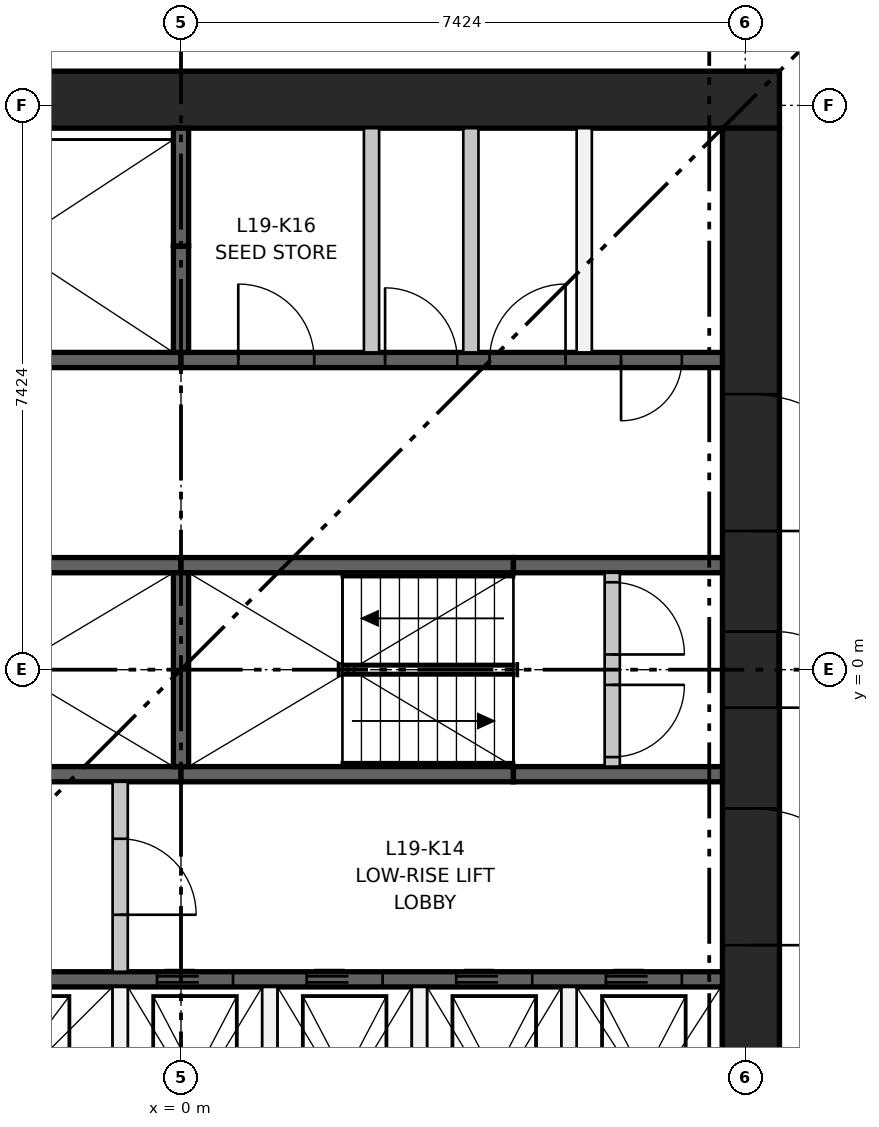
"""IFC4 building model, lengths in metres.
Left out: names, types, materials, properties, quantities, classifications, styles, units other than length and angle.
Written with IfcOpenShell. Run it as: python <this file> out.ifc"""

import sys

from ifc_helpers import new_model, si_unit, direction, frame, frame_2d, origin, place, context, subcontext, project, spatial, rectangle, extrude, element, fill, save


model = new_model("IFC4")
c1 = context("Model", 3, precision=1e-05, world=origin(), true_north=direction((0.0, 1.0)))
c2 = subcontext(c1, "Body", "Model", "MODEL_VIEW")
j1 = project(units=[si_unit("LENGTHUNIT", "METRE"), si_unit("PLANEANGLEUNIT", "RADIAN")], contexts=[c1])
p1 = place(None, origin())
s1 = spatial("IfcSite", under=j1, at=p1, CompositionType="ELEMENT")
p2 = place(p1, origin())
s2 = spatial("IfcBuilding", under=s1, at=p2, CompositionType="ELEMENT")
p3 = place(p2, frame((0.0, 0.0, 76.4)))
s3 = spatial("IfcBuildingStorey", under=s2, at=p3, CompositionType="ELEMENT", Elevation=76.4)
p4 = place(p3, frame((-7.874, 7.499, 0.0), z_axis=(0.0, 0.0, 1.0), x_axis=(1.0, 0.0, 0.0)))
e1 = element("IfcWall", 1, at=p4, inside=s3, PredefinedType="SHEAR", context=c2, shape_type="SweptSolid", body=[
    extrude(rectangle(XDim=15.748, YDim=0.75, at=frame_2d((7.874, 0.0))), origin(), (0.0, 0.0, 1.0), 3.65),
])
p5 = place(p3, frame((7.499, -7.124, 0.0), z_axis=(0.0, 0.0, 1.0), x_axis=(0.0, 1.0, 0.0)))
e2 = element("IfcWall", 2, at=p5, inside=s3, PredefinedType="SHEAR", context=c2, shape_type="SweptSolid", body=[
    extrude(rectangle(XDim=14.248, YDim=0.75, at=frame_2d((7.124, 0.0))), origin(), (0.0, 0.0, 1.0), 3.65),
])
p6 = place(p5, frame((6.624, 0.0, 0.0)))
e3 = element("IfcOpeningElement", 3, at=p6, cuts=e2, PredefinedType="OPENING", context=c2, shape_type="SweptSolid", body=[
    extrude(rectangle(XDim=1.0, YDim=2.1, at=frame_2d((0.5, 1.05))), frame((0.0, 0.385, 0.0), z_axis=(0.0, -1.0, 0.0), x_axis=(1.0, 0.0, 0.0)), (0.0, 0.0, 1.0), 0.77),
])
p7 = place(p5, frame((3.5, 0.0, 0.0)))
e4 = element("IfcOpeningElement", 4, at=p7, cuts=e2, PredefinedType="OPENING", context=c2, shape_type="SweptSolid", body=[
    extrude(rectangle(XDim=1.8, YDim=2.1, at=frame_2d((0.9, 1.05))), frame((0.0, 0.385, 0.0), z_axis=(0.0, -1.0, 0.0), x_axis=(1.0, 0.0, 0.0)), (0.0, 0.0, 1.0), 0.77),
])
p8 = place(p5, frame((8.948, 0.0, 0.0)))
e5 = element("IfcOpeningElement", 5, at=p8, cuts=e2, PredefinedType="OPENING", context=c2, shape_type="SweptSolid", body=[
    extrude(rectangle(XDim=1.8, YDim=2.1, at=frame_2d((0.9, 1.05))), frame((0.0, 0.385, 0.0), z_axis=(0.0, -1.0, 0.0), x_axis=(1.0, 0.0, 0.0)), (0.0, 0.0, 1.0), 0.77),
])
p9 = place(p3, frame((-7.124, -4.074, 0.0), z_axis=(0.0, 0.0, 1.0), x_axis=(1.0, 0.0, 0.0)))
e6 = element("IfcWall", 6, at=p9, inside=s3, PredefinedType="SHEAR", context=c2, shape_type="SweptSolid", body=[
    extrude(rectangle(XDim=14.248, YDim=0.2, at=frame_2d((7.124, 0.0))), origin(), (0.0, 0.0, 1.0), 3.3),
])
p10 = place(p9, frame((1.069, 0.0, 0.0)))
e7 = element("IfcOpeningElement", 7, at=p10, cuts=e6, PredefinedType="OPENING", context=c2, shape_type="SweptSolid", body=[
    extrude(rectangle(XDim=1.1, YDim=2.1, at=frame_2d((0.55, 1.05))), frame((0.0, 0.11, 0.0), z_axis=(0.0, -1.0, 0.0), x_axis=(1.0, 0.0, 0.0)), (0.0, 0.0, 1.0), 0.22),
])
p11 = place(p9, frame((4.206, 0.0, 0.0)))
e8 = element("IfcOpeningElement", 8, at=p11, cuts=e6, PredefinedType="OPENING", context=c2, shape_type="SweptSolid", body=[
    extrude(rectangle(XDim=1.1, YDim=2.1, at=frame_2d((0.55, 1.05))), frame((0.0, 0.11, 0.0), z_axis=(0.0, -1.0, 0.0), x_axis=(1.0, 0.0, 0.0)), (0.0, 0.0, 1.0), 0.22),
])
p12 = place(p9, frame((6.808, 0.0, 0.0)))
e9 = element("IfcOpeningElement", 9, at=p12, cuts=e6, PredefinedType="OPENING", context=c2, shape_type="SweptSolid", body=[
    extrude(rectangle(XDim=1.0, YDim=2.1, at=frame_2d((0.5, 1.05))), frame((0.0, 0.11, 0.0), z_axis=(0.0, -1.0, 0.0), x_axis=(1.0, 0.0, 0.0)), (0.0, 0.0, 1.0), 0.22),
])
p13 = place(p9, frame((8.777, 0.0, 0.0)))
e10 = element("IfcOpeningElement", 10, at=p13, cuts=e6, PredefinedType="OPENING", context=c2, shape_type="SweptSolid", body=[
    extrude(rectangle(XDim=1.0, YDim=2.1, at=frame_2d((0.5, 1.05))), frame((0.0, 0.11, 0.0), z_axis=(0.0, -1.0, 0.0), x_axis=(1.0, 0.0, 0.0)), (0.0, 0.0, 1.0), 0.22),
])
p14 = place(p9, frame((10.745, 0.0, 0.0)))
e11 = element("IfcOpeningElement", 11, at=p14, cuts=e6, PredefinedType="OPENING", context=c2, shape_type="SweptSolid", body=[
    extrude(rectangle(XDim=1.0, YDim=2.1, at=frame_2d((0.5, 1.05))), frame((0.0, 0.11, 0.0), z_axis=(0.0, -1.0, 0.0), x_axis=(1.0, 0.0, 0.0)), (0.0, 0.0, 1.0), 0.22),
])
p15 = place(p9, frame((12.714, 0.0, 0.0)))
e12 = element("IfcOpeningElement", 12, at=p15, cuts=e6, PredefinedType="OPENING", context=c2, shape_type="SweptSolid", body=[
    extrude(rectangle(XDim=1.0, YDim=2.1, at=frame_2d((0.5, 1.05))), frame((0.0, 0.11, 0.0), z_axis=(0.0, -1.0, 0.0), x_axis=(1.0, 0.0, 0.0)), (0.0, 0.0, 1.0), 0.22),
])
p16 = place(p3, frame((-7.124, 4.074, 0.0), z_axis=(0.0, 0.0, 1.0), x_axis=(1.0, 0.0, 0.0)))
e13 = element("IfcWall", 13, at=p16, inside=s3, PredefinedType="SHEAR", context=c2, shape_type="SweptSolid", body=[
    extrude(rectangle(XDim=7.124, YDim=0.2, at=frame_2d((3.562, 0.0))), origin(), (0.0, 0.0, 1.0), 3.3),
])
p17 = place(p3, frame((0.0, 4.074, 0.0), z_axis=(0.0, 0.0, 1.0), x_axis=(1.0, 0.0, 0.0)))
e14 = element("IfcWall", 14, at=p17, inside=s3, PredefinedType="SHEAR", context=c2, shape_type="SweptSolid", body=[
    extrude(rectangle(XDim=7.124, YDim=0.2, at=frame_2d((3.562, 0.0))), origin(), (0.0, 0.0, 1.0), 3.3),
])
p18 = place(p17, frame((0.753, 0.0, 0.0)))
e15 = element("IfcOpeningElement", 15, at=p18, cuts=e14, PredefinedType="OPENING", context=c2, shape_type="SweptSolid", body=[
    extrude(rectangle(XDim=1.0, YDim=2.1, at=frame_2d((0.5, 1.05))), frame((0.0, 0.11, 0.0), z_axis=(0.0, -1.0, 0.0), x_axis=(1.0, 0.0, 0.0)), (0.0, 0.0, 1.0), 0.22),
])
p19 = place(p17, frame((2.685, 0.0, 0.0)))
e16 = element("IfcOpeningElement", 16, at=p19, cuts=e14, PredefinedType="OPENING", context=c2, shape_type="SweptSolid", body=[
    extrude(rectangle(XDim=0.95, YDim=2.1, at=frame_2d((0.475, 1.05))), frame((0.0, 0.11, 0.0), z_axis=(0.0, -1.0, 0.0), x_axis=(1.0, 0.0, 0.0)), (0.0, 0.0, 1.0), 0.22),
])
p20 = place(p17, frame((4.06, 0.0, 0.0)))
e17 = element("IfcOpeningElement", 17, at=p20, cuts=e14, PredefinedType="OPENING", context=c2, shape_type="SweptSolid", body=[
    extrude(rectangle(XDim=1.0, YDim=2.1, at=frame_2d((0.5, 1.05))), frame((0.0, 0.11, 0.0), z_axis=(0.0, -1.0, 0.0), x_axis=(1.0, 0.0, 0.0)), (0.0, 0.0, 1.0), 0.22),
])
p21 = place(p17, frame((5.79, 0.0, 0.0)))
e18 = element("IfcOpeningElement", 18, at=p21, cuts=e14, PredefinedType="OPENING", context=c2, shape_type="SweptSolid", body=[
    extrude(rectangle(XDim=0.8, YDim=2.1, at=frame_2d((0.4, 1.05))), frame((0.0, 0.11, 0.0), z_axis=(0.0, -1.0, 0.0), x_axis=(1.0, 0.0, 0.0)), (0.0, 0.0, 1.0), 0.22),
])
for number, where, z_axis, x_axis in (
    (19, (-4.374, -1.375, 0.0), (0.0, 0.0, 1.0), (1.0, 0.0, 0.0)),
    (20, (0.0, -1.375, 0.0), (0.0, 0.0, 1.0), (1.0, 0.0, 0.0)),
):
    element("IfcWall", number, at=place(p3, frame(where, z_axis=z_axis, x_axis=x_axis)), inside=s3, PredefinedType="SHEAR", context=c2, shape_type="SweptSolid", body=[
        extrude(rectangle(XDim=4.374, YDim=0.2, at=frame_2d((2.187, 0.0))), origin(), (0.0, 0.0, 1.0), 3.3),
    ])
p22 = place(p3, frame((4.374, -1.375, 0.0), z_axis=(0.0, 0.0, 1.0), x_axis=(1.0, 0.0, 0.0)))
e21 = element("IfcWall", 21, at=p22, inside=s3, PredefinedType="SHEAR", context=c2, shape_type="SweptSolid", body=[
    extrude(rectangle(XDim=2.75, YDim=0.2, at=frame_2d((1.375, 0.0))), origin(), (0.0, 0.0, 1.0), 3.3),
])
for number, where, z_axis, x_axis in (
    (22, (-4.374, 1.375, 0.0), (0.0, 0.0, 1.0), (1.0, 0.0, 0.0)),
    (23, (0.0, 1.375, 0.0), (0.0, 0.0, 1.0), (1.0, 0.0, 0.0)),
):
    element("IfcWall", number, at=place(p3, frame(where, z_axis=z_axis, x_axis=x_axis)), inside=s3, PredefinedType="SHEAR", context=c2, shape_type="SweptSolid", body=[
        extrude(rectangle(XDim=4.374, YDim=0.2, at=frame_2d((2.187, 0.0))), origin(), (0.0, 0.0, 1.0), 3.3),
    ])
p23 = place(p3, frame((4.374, 1.375, 0.0), z_axis=(0.0, 0.0, 1.0), x_axis=(1.0, 0.0, 0.0)))
e24 = element("IfcWall", 24, at=p23, inside=s3, PredefinedType="SHEAR", context=c2, shape_type="SweptSolid", body=[
    extrude(rectangle(XDim=2.75, YDim=0.2, at=frame_2d((1.375, 0.0))), origin(), (0.0, 0.0, 1.0), 3.3),
])
p24 = place(p3, frame((0.0, -1.275, 0.0), z_axis=(0.0, 0.0, 1.0), x_axis=(0.0, 1.0, 0.0)))
e25 = element("IfcWall", 25, at=p24, inside=s3, PredefinedType="SHEAR", context=c2, shape_type="SweptSolid", body=[
    extrude(rectangle(XDim=2.55, YDim=0.2, at=frame_2d((1.275, 0.0))), origin(), (0.0, 0.0, 1.0), 3.3),
])
p25 = place(p3, frame((-0.8, -7.124, 0.0), z_axis=(0.0, 0.0, 1.0), x_axis=(0.0, 1.0, 0.0)))
e26 = element("IfcWall", 26, at=p25, inside=s3, PredefinedType="PARTITIONING", context=c2, shape_type="SweptSolid", body=[
    extrude(rectangle(XDim=2.95, YDim=0.2, at=frame_2d((1.475, 0.0))), origin(), (0.0, 0.0, 1.0), 3.3),
])
p26 = place(p3, frame((-0.8, -3.974, 0.0), z_axis=(0.0, 0.0, 1.0), x_axis=(0.0, 1.0, 0.0)))
e27 = element("IfcWall", 27, at=p26, inside=s3, PredefinedType="PARTITIONING", context=c2, shape_type="SweptSolid", body=[
    extrude(rectangle(XDim=2.499, YDim=0.2, at=frame_2d((1.25, 0.0))), origin(), (0.0, 0.0, 1.0), 3.3),
])
p27 = place(p26, frame((0.75, 0.0, 0.0)))
e28 = element("IfcOpeningElement", 28, at=p27, cuts=e27, PredefinedType="OPENING", context=c2, shape_type="SweptSolid", body=[
    extrude(rectangle(XDim=1.0, YDim=2.1, at=frame_2d((0.5, 1.05))), frame((0.0, 0.11, 0.0), z_axis=(0.0, -1.0, 0.0), x_axis=(1.0, 0.0, 0.0)), (0.0, 0.0, 1.0), 0.22),
])
for number, where, z_axis, x_axis in (
    (29, (1.168, -7.124, 0.0), (0.0, 0.0, 1.0), (0.0, 1.0, 0.0)),
    (30, (3.137, -7.124, 0.0), (0.0, 0.0, 1.0), (0.0, 1.0, 0.0)),
    (31, (5.105, -7.124, 0.0), (0.0, 0.0, 1.0), (0.0, 1.0, 0.0)),
):
    element("IfcWall", number, at=place(p3, frame(where, z_axis=z_axis, x_axis=x_axis)), inside=s3, PredefinedType="PARTITIONING", context=c2, shape_type="SweptSolid", body=[
        extrude(rectangle(XDim=2.95, YDim=0.2, at=frame_2d((1.475, 0.0))), origin(), (0.0, 0.0, 1.0), 3.3),
    ])
p28 = place(p3, frame((0.0, 4.174, 0.0), z_axis=(0.0, 0.0, 1.0), x_axis=(0.0, 1.0, 0.0)))
e32 = element("IfcWall", 32, at=p28, inside=s3, PredefinedType="SHEAR", context=c2, shape_type="SweptSolid", body=[
    extrude(rectangle(XDim=1.4, YDim=0.2, at=frame_2d((0.7, 0.0))), origin(), (0.0, 0.0, 1.0), 3.3),
])
p29 = place(p3, frame((0.0, 5.574, 0.0), z_axis=(0.0, 0.0, 1.0), x_axis=(0.0, 1.0, 0.0)))
e33 = element("IfcWall", 33, at=p29, inside=s3, PredefinedType="SHEAR", context=c2, shape_type="SweptSolid", body=[
    extrude(rectangle(XDim=1.55, YDim=0.2, at=frame_2d((0.775, 0.0))), origin(), (0.0, 0.0, 1.0), 3.3),
])
for number, where, z_axis, x_axis in (
    (34, (2.507, 4.174, 0.0), (0.0, 0.0, 1.0), (0.0, 1.0, 0.0)),
    (35, (3.814, 4.174, 0.0), (0.0, 0.0, 1.0), (0.0, 1.0, 0.0)),
    (36, (5.305, 4.174, 0.0), (0.0, 0.0, 1.0), (0.0, 1.0, 0.0)),
):
    element("IfcWall", number, at=place(p3, frame(where, z_axis=z_axis, x_axis=x_axis)), inside=s3, PredefinedType="PARTITIONING", context=c2, shape_type="SweptSolid", body=[
        extrude(rectangle(XDim=2.95, YDim=0.2, at=frame_2d((1.475, 0.0))), origin(), (0.0, 0.0, 1.0), 3.3),
    ])
p30 = place(p3, frame((5.674, -1.275, 0.0), z_axis=(0.0, 0.0, 1.0), x_axis=(0.0, 1.0, 0.0)))
e37 = element("IfcWall", 37, at=p30, inside=s3, PredefinedType="PARTITIONING", context=c2, shape_type="SweptSolid", body=[
    extrude(rectangle(XDim=2.55, YDim=0.2, at=frame_2d((1.275, 0.0))), origin(), (0.0, 0.0, 1.0), 3.3),
])
p31 = place(p30, frame((0.125, 0.0, 0.0)))
e38 = element("IfcOpeningElement", 38, at=p31, cuts=e37, PredefinedType="OPENING", context=c2, shape_type="SweptSolid", body=[
    extrude(rectangle(XDim=0.95, YDim=2.1, at=frame_2d((0.475, 1.05))), frame((0.0, 0.11, 0.0), z_axis=(0.0, -1.0, 0.0), x_axis=(1.0, 0.0, 0.0)), (0.0, 0.0, 1.0), 0.22),
])
p32 = place(p30, frame((1.475, 0.0, 0.0)))
e39 = element("IfcOpeningElement", 39, at=p32, cuts=e37, PredefinedType="OPENING", context=c2, shape_type="SweptSolid", body=[
    extrude(rectangle(XDim=0.95, YDim=2.1, at=frame_2d((0.475, 1.05))), frame((0.0, 0.11, 0.0), z_axis=(0.0, -1.0, 0.0), x_axis=(1.0, 0.0, 0.0)), (0.0, 0.0, 1.0), 0.22),
])
p33 = place(p12, origin())
e40 = element("IfcDoor", 40, at=p33, inside=s3, OperationType="DOUBLE_DOOR_SLIDING", PredefinedType="DOOR", context=c2, shape_type="SweptSolid", body=[
    extrude(rectangle(XDim=1.0, YDim=2.1, at=frame_2d((0.5, 1.05))), frame((0.0, 0.025, 0.0), z_axis=(0.0, -1.0, 0.0), x_axis=(1.0, 0.0, 0.0)), (0.0, 0.0, 1.0), 0.05),
])
fill(e9, e40)
p34 = place(p13, origin())
e41 = element("IfcDoor", 41, at=p34, inside=s3, OperationType="DOUBLE_DOOR_SLIDING", PredefinedType="DOOR", context=c2, shape_type="SweptSolid", body=[
    extrude(rectangle(XDim=1.0, YDim=2.1, at=frame_2d((0.5, 1.05))), frame((0.0, 0.025, 0.0), z_axis=(0.0, -1.0, 0.0), x_axis=(1.0, 0.0, 0.0)), (0.0, 0.0, 1.0), 0.05),
])
fill(e10, e41)
p35 = place(p14, origin())
e42 = element("IfcDoor", 42, at=p35, inside=s3, OperationType="DOUBLE_DOOR_SLIDING", PredefinedType="DOOR", context=c2, shape_type="SweptSolid", body=[
    extrude(rectangle(XDim=1.0, YDim=2.1, at=frame_2d((0.5, 1.05))), frame((0.0, 0.025, 0.0), z_axis=(0.0, -1.0, 0.0), x_axis=(1.0, 0.0, 0.0)), (0.0, 0.0, 1.0), 0.05),
])
fill(e11, e42)
p36 = place(p15, origin())
e43 = element("IfcDoor", 43, at=p36, inside=s3, OperationType="DOUBLE_DOOR_SLIDING", PredefinedType="DOOR", context=c2, shape_type="SweptSolid", body=[
    extrude(rectangle(XDim=1.0, YDim=2.1, at=frame_2d((0.5, 1.05))), frame((0.0, 0.025, 0.0), z_axis=(0.0, -1.0, 0.0), x_axis=(1.0, 0.0, 0.0)), (0.0, 0.0, 1.0), 0.05),
])
fill(e12, e43)
p37 = place(p31, frame((0.95, 0.0, 0.0), z_axis=(0.0, 0.0, 1.0), x_axis=(-1.0, 0.0, 0.0)))
e44 = element("IfcDoor", 44, at=p37, inside=s3, OperationType="SINGLE_SWING_RIGHT", PredefinedType="DOOR", context=c2, shape_type="SweptSolid", body=[
    extrude(rectangle(XDim=0.95, YDim=2.1, at=frame_2d((0.475, 1.05))), frame((0.0, 0.025, 0.0), z_axis=(0.0, -1.0, 0.0), x_axis=(1.0, 0.0, 0.0)), (0.0, 0.0, 1.0), 0.05),
])
fill(e38, e44)
p38 = place(p32, frame((0.95, 0.0, 0.0), z_axis=(0.0, 0.0, 1.0), x_axis=(-1.0, 0.0, 0.0)))
e45 = element("IfcDoor", 45, at=p38, inside=s3, OperationType="SINGLE_SWING_LEFT", PredefinedType="DOOR", context=c2, shape_type="SweptSolid", body=[
    extrude(rectangle(XDim=0.95, YDim=2.1, at=frame_2d((0.475, 1.05))), frame((0.0, 0.025, 0.0), z_axis=(0.0, -1.0, 0.0), x_axis=(1.0, 0.0, 0.0)), (0.0, 0.0, 1.0), 0.05),
])
fill(e39, e45)
p39 = place(p27, frame((1.0, 0.0, 0.0), z_axis=(0.0, 0.0, 1.0), x_axis=(-1.0, 0.0, 0.0)))
e46 = element("IfcDoor", 46, at=p39, inside=s3, OperationType="SINGLE_SWING_LEFT", PredefinedType="DOOR", context=c2, shape_type="SweptSolid", body=[
    extrude(rectangle(XDim=1.0, YDim=2.1, at=frame_2d((0.5, 1.05))), frame((0.0, 0.025, 0.0), z_axis=(0.0, -1.0, 0.0), x_axis=(1.0, 0.0, 0.0)), (0.0, 0.0, 1.0), 0.05),
])
fill(e28, e46)
p40 = place(p18, origin())
e47 = element("IfcDoor", 47, at=p40, inside=s3, OperationType="SINGLE_SWING_LEFT", PredefinedType="DOOR", context=c2, shape_type="SweptSolid", body=[
    extrude(rectangle(XDim=1.0, YDim=2.1, at=frame_2d((0.5, 1.05))), frame((0.0, 0.025, 0.0), z_axis=(0.0, -1.0, 0.0), x_axis=(1.0, 0.0, 0.0)), (0.0, 0.0, 1.0), 0.05),
])
fill(e15, e47)
p41 = place(p19, origin())
e48 = element("IfcDoor", 48, at=p41, inside=s3, OperationType="SINGLE_SWING_LEFT", PredefinedType="DOOR", context=c2, shape_type="SweptSolid", body=[
    extrude(rectangle(XDim=0.95, YDim=2.1, at=frame_2d((0.475, 1.05))), frame((0.0, 0.025, 0.0), z_axis=(0.0, -1.0, 0.0), x_axis=(1.0, 0.0, 0.0)), (0.0, 0.0, 1.0), 0.05),
])
fill(e16, e48)
p42 = place(p20, origin())
e49 = element("IfcDoor", 49, at=p42, inside=s3, OperationType="SINGLE_SWING_RIGHT", PredefinedType="DOOR", context=c2, shape_type="SweptSolid", body=[
    extrude(rectangle(XDim=1.0, YDim=2.1, at=frame_2d((0.5, 1.05))), frame((0.0, 0.025, 0.0), z_axis=(0.0, -1.0, 0.0), x_axis=(1.0, 0.0, 0.0)), (0.0, 0.0, 1.0), 0.05),
])
fill(e17, e49)
p43 = place(p21, frame((0.8, 0.0, 0.0), z_axis=(0.0, 0.0, 1.0), x_axis=(-1.0, 0.0, 0.0)))
e50 = element("IfcDoor", 50, at=p43, inside=s3, OperationType="SINGLE_SWING_LEFT", PredefinedType="DOOR", context=c2, shape_type="SweptSolid", body=[
    extrude(rectangle(XDim=0.8, YDim=2.1, at=frame_2d((0.4, 1.05))), frame((0.0, 0.025, 0.0), z_axis=(0.0, -1.0, 0.0), x_axis=(1.0, 0.0, 0.0)), (0.0, 0.0, 1.0), 0.05),
])
fill(e18, e50)
p44 = place(p6, frame((1.0, 0.0, 0.0), z_axis=(0.0, 0.0, 1.0), x_axis=(-1.0, 0.0, 0.0)))
e51 = element("IfcDoor", 51, at=p44, inside=s3, OperationType="SINGLE_SWING_LEFT", PredefinedType="DOOR", context=c2, shape_type="SweptSolid", body=[
    extrude(rectangle(XDim=1.0, YDim=2.1, at=frame_2d((0.5, 1.05))), frame((0.0, 0.375, 0.0), z_axis=(0.0, -1.0, 0.0), x_axis=(1.0, 0.0, 0.0)), (0.0, 0.0, 1.0), 0.05),
])
fill(e3, e51)
p45 = place(p7, frame((1.8, 0.0, 0.0), z_axis=(0.0, 0.0, 1.0), x_axis=(-1.0, 0.0, 0.0)))
e52 = element("IfcDoor", 52, at=p45, inside=s3, OperationType="DOUBLE_DOOR_SINGLE_SWING", PredefinedType="DOOR", context=c2, shape_type="SweptSolid", body=[
    extrude(rectangle(XDim=1.8, YDim=2.1, at=frame_2d((0.9, 1.05))), frame((0.0, 0.025, 0.0), z_axis=(0.0, -1.0, 0.0), x_axis=(1.0, 0.0, 0.0)), (0.0, 0.0, 1.0), 0.05),
])
fill(e4, e52)
p46 = place(p8, frame((1.8, 0.0, 0.0), z_axis=(0.0, 0.0, 1.0), x_axis=(-1.0, 0.0, 0.0)))
e53 = element("IfcDoor", 53, at=p46, inside=s3, OperationType="DOUBLE_DOOR_SINGLE_SWING", PredefinedType="DOOR", context=c2, shape_type="SweptSolid", body=[
    extrude(rectangle(XDim=1.8, YDim=2.1, at=frame_2d((0.9, 1.05))), frame((0.0, 0.025, 0.0), z_axis=(0.0, -1.0, 0.0), x_axis=(1.0, 0.0, 0.0)), (0.0, 0.0, 1.0), 0.05),
])
fill(e5, e53)
save(model, sys.argv[1])
